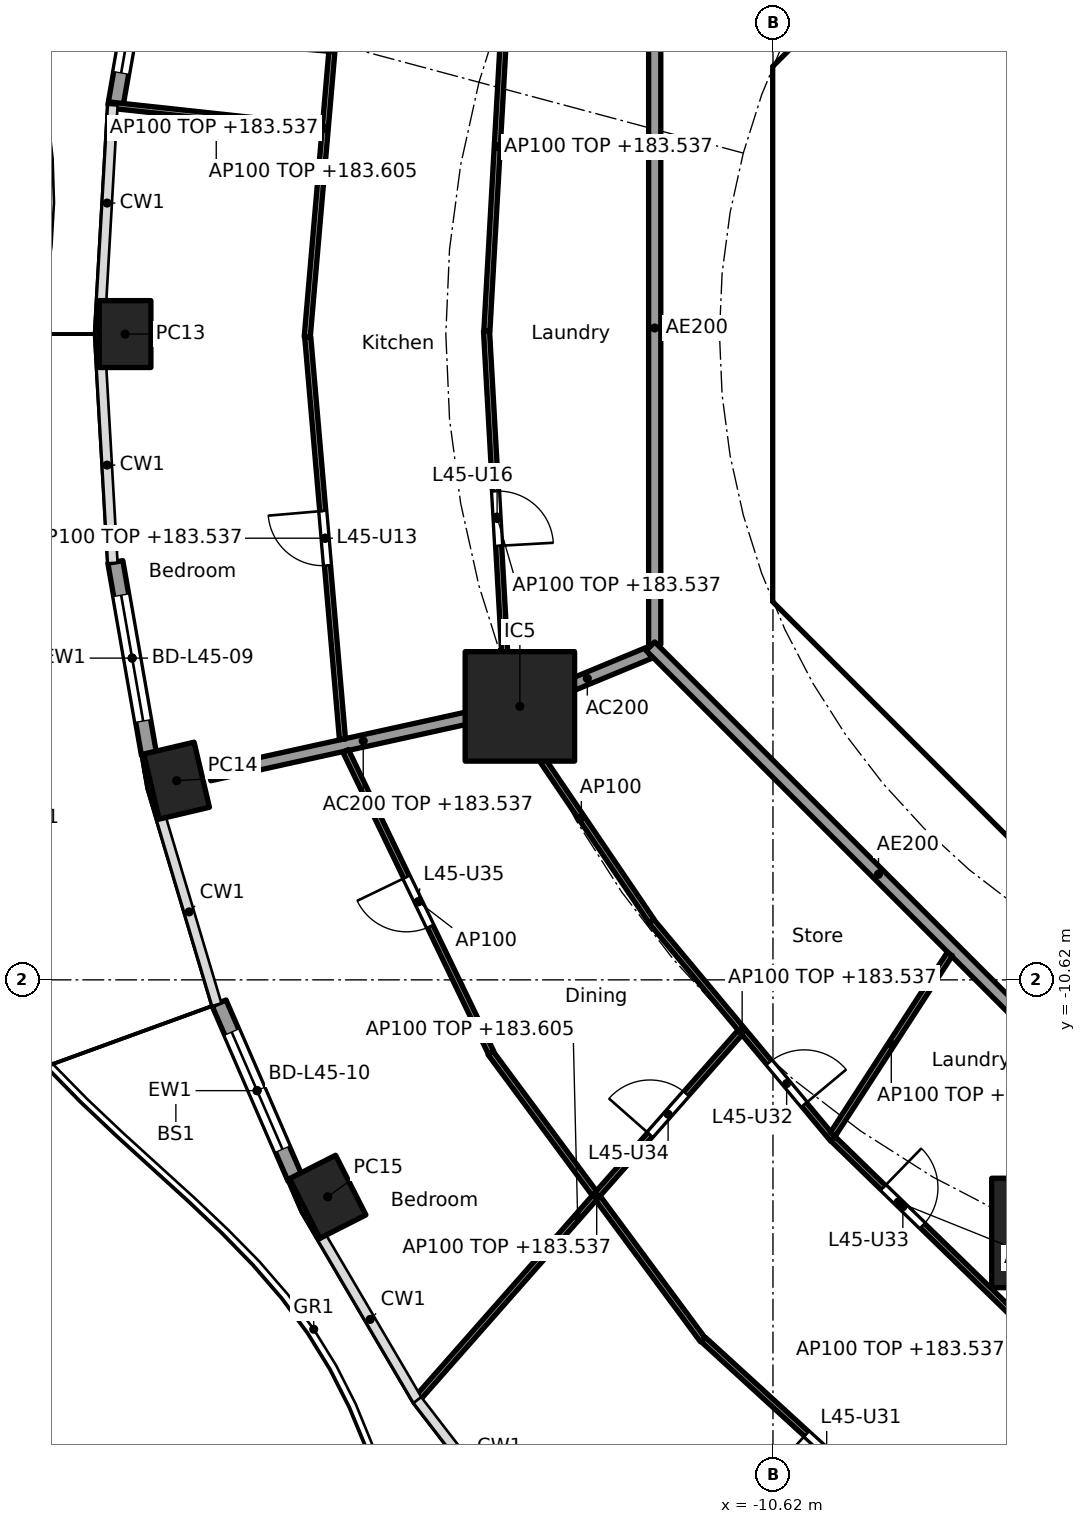
"""IFC4 building model, lengths in metres.
Left out: names, types, materials, properties, quantities, classifications, styles, units other than length and angle.
Written with IfcOpenShell. Run it as: python <this file> out.ifc"""

import sys

from ifc_helpers import new_model, si_unit, direction, frame, frame_2d, origin, origin_2d, place, context, subcontext, project, spatial, polyline, rectangle, hollow_rectangle, outline, extrude, element, fill, save


model = new_model("IFC4")
c1 = context("Model", 3, precision=1e-05, world=origin(), true_north=direction((0.0, 1.0)))
c2 = subcontext(c1, "Body", "Model", "MODEL_VIEW")
j1 = project(units=[si_unit("LENGTHUNIT", "METRE"), si_unit("PLANEANGLEUNIT", "RADIAN")], contexts=[c1])
p1 = place(None, origin())
s1 = spatial("IfcSite", under=j1, at=p1, CompositionType="ELEMENT")
p2 = place(p1, origin())
s2 = spatial("IfcBuilding", under=s1, at=p2, CompositionType="ELEMENT")
p3 = place(p2, frame((0.0, 0.0, 180.7)))
s3 = spatial("IfcBuildingStorey", under=s2, at=p3, CompositionType="ELEMENT", Elevation=180.7)
for number, where, z_axis, x_axis in (
    (1, (-21.275, 0.0, 0.0), (0.0, 0.0, 1.0), (0.0, -1.0, 0.0)),
    (2, (-20.427, -7.344, 0.0), (0.0, 0.0, 1.0), (0.229, -0.973, 0.0)),
    (3, (-17.942, -14.188, 0.0), (0.0, 0.0, 1.0), (0.452, -0.892, 0.0)),
):
    element("IfcColumn", number, at=place(p3, frame(where, z_axis=z_axis, x_axis=x_axis)), inside=s3, PredefinedType="COLUMN", context=c2, shape_type="SweptSolid", body=[
        extrude(hollow_rectangle(XDim=1.1, YDim=0.85, WallThickness=0.036, at=origin_2d()), origin(), (0.0, 0.0, 1.0), 3.7),
    ])
for number, where, z_axis, x_axis in (
    (4, (-14.782, -6.123, 0.0), (0.0, 0.0, 1.0), (1.0, 0.0, 0.0)),
    (5, (-6.123, -14.782, 0.0), (0.0, 0.0, 1.0), (1.0, 0.0, 0.0)),
):
    element("IfcColumn", number, at=place(p3, frame(where, z_axis=z_axis, x_axis=x_axis)), inside=s3, PredefinedType="COLUMN", context=c2, shape_type="SweptSolid", body=[
        extrude(rectangle(XDim=1.8, YDim=1.8, at=origin_2d()), origin(), (0.0, 0.0, 1.0), 3.7),
    ])
p4 = place(p3, frame((-21.435, 3.747, 0.0), z_axis=(0.0, 0.0, 1.0), x_axis=(0.172223552479, 0.98505789067, 0.0)))
e6 = element("IfcWall", 6, at=p4, inside=s3, PredefinedType="SOLIDWALL", context=c2, shape_type="SweptSolid", body=[
    extrude(rectangle(XDim=3.211, YDim=0.25, at=frame_2d((1.605, 0.0))), origin(), (0.0, 0.0, 1.0), 3.44),
])
p5 = place(p4, frame((0.555, 0.0, 0.0)))
e7 = element("IfcOpeningElement", 7, at=p5, cuts=e6, PredefinedType="OPENING", context=c2, shape_type="SweptSolid", body=[
    extrude(rectangle(XDim=2.1, YDim=2.4, at=frame_2d((1.05, 1.2))), frame((0.0, 0.135, 0.0), z_axis=(0.0, -1.0, 0.0), x_axis=(1.0, 0.0, 0.0)), (0.0, 0.0, 1.0), 0.27),
])
p6 = place(p3, frame((-20.882, -6.91, 0.0), z_axis=(0.0, 0.0, 1.0), x_axis=(-0.172223552479, 0.98505789067, 0.0)))
e8 = element("IfcWall", 8, at=p6, inside=s3, PredefinedType="SOLIDWALL", context=c2, shape_type="SweptSolid", body=[
    extrude(rectangle(XDim=3.211, YDim=0.25, at=frame_2d((1.605, 0.0))), origin(), (0.0, 0.0, 1.0), 3.44),
])
p7 = place(p6, frame((0.555, 0.0, 0.0)))
e9 = element("IfcOpeningElement", 9, at=p7, cuts=e8, PredefinedType="OPENING", context=c2, shape_type="SweptSolid", body=[
    extrude(rectangle(XDim=2.1, YDim=2.4, at=frame_2d((1.05, 1.2))), frame((0.0, 0.135, 0.0), z_axis=(0.0, -1.0, 0.0), x_axis=(1.0, 0.0, 0.0)), (0.0, 0.0, 1.0), 0.27),
])
p8 = place(p3, frame((-18.479, -13.883, 0.0), z_axis=(0.0, 0.0, 1.0), x_axis=(-0.397620521824, 0.917549955384, 0.0)))
e10 = element("IfcWall", 10, at=p8, inside=s3, PredefinedType="SOLIDWALL", context=c2, shape_type="SweptSolid", body=[
    extrude(rectangle(XDim=3.142, YDim=0.25, at=frame_2d((1.571, 0.0))), origin(), (0.0, 0.0, 1.0), 3.44),
])
p9 = place(p8, frame((0.521, 0.0, 0.0)))
e11 = element("IfcOpeningElement", 11, at=p9, cuts=e10, PredefinedType="OPENING", context=c2, shape_type="SweptSolid", body=[
    extrude(rectangle(XDim=2.1, YDim=2.4, at=frame_2d((1.05, 1.2))), frame((0.0, 0.135, 0.0), z_axis=(0.0, -1.0, 0.0), x_axis=(1.0, 0.0, 0.0)), (0.0, 0.0, 1.0), 0.27),
])
p10 = place(p3, frame((-4.613, 9.988, 0.0), z_axis=(0.0, 0.0, 1.0), x_axis=(-0.707106781187, -0.707106781187, 0.0)))
e12 = element("IfcWall", 12, at=p10, inside=s3, PredefinedType="SHEAR", context=c2, shape_type="SweptSolid", body=[
    extrude(rectangle(XDim=7.602, YDim=0.6, at=frame_2d((3.801, 0.0))), origin(), (0.0, 0.0, 1.0), 3.44),
])
p11 = place(p10, frame((0.351, 0.0, 0.0)))
e13 = element("IfcOpeningElement", 13, at=p11, cuts=e12, PredefinedType="OPENING", context=c2, shape_type="SweptSolid", body=[
    extrude(rectangle(XDim=1.1, YDim=2.1, at=frame_2d((0.55, 1.05))), frame((0.0, 0.31, 0.0), z_axis=(0.0, -1.0, 0.0), x_axis=(1.0, 0.0, 0.0)), (0.0, 0.0, 1.0), 0.62),
])
p12 = place(p3, frame((-10.325, 3.801, 0.0), z_axis=(0.0, 0.0, 1.0), x_axis=(0.0, -1.0, 0.0)))
e14 = element("IfcWall", 14, at=p12, inside=s3, PredefinedType="SHEAR", context=c2, shape_type="SweptSolid", body=[
    extrude(rectangle(XDim=7.602, YDim=0.6, at=frame_2d((3.801, 0.0))), origin(), (0.0, 0.0, 1.0), 3.44),
])
p13 = place(p12, frame((0.651, 0.0, 0.0)))
e15 = element("IfcOpeningElement", 15, at=p13, cuts=e14, PredefinedType="OPENING", context=c2, shape_type="SweptSolid", body=[
    extrude(rectangle(XDim=1.5, YDim=2.1, at=frame_2d((0.75, 1.05))), frame((0.0, 0.31, 0.0), z_axis=(0.0, -1.0, 0.0), x_axis=(1.0, 0.0, 0.0)), (0.0, 0.0, 1.0), 0.62),
])
p14 = place(p12, frame((5.451, 0.0, 0.0)))
e16 = element("IfcOpeningElement", 16, at=p14, cuts=e14, PredefinedType="OPENING", context=c2, shape_type="SweptSolid", body=[
    extrude(rectangle(XDim=1.5, YDim=2.1, at=frame_2d((0.75, 1.05))), frame((0.0, 0.31, 0.0), z_axis=(0.0, -1.0, 0.0), x_axis=(1.0, 0.0, 0.0)), (0.0, 0.0, 1.0), 0.62),
])
p15 = place(p3, frame((-9.988, -4.613, 0.0), z_axis=(0.0, 0.0, 1.0), x_axis=(0.707106781187, -0.707106781187, 0.0)))
e17 = element("IfcWall", 17, at=p15, inside=s3, PredefinedType="SHEAR", context=c2, shape_type="SweptSolid", body=[
    extrude(rectangle(XDim=7.602, YDim=0.6, at=frame_2d((3.801, 0.0))), origin(), (0.0, 0.0, 1.0), 3.44),
])
p16 = place(p15, frame((6.151, 0.0, 0.0)))
e18 = element("IfcOpeningElement", 18, at=p16, cuts=e17, PredefinedType="OPENING", context=c2, shape_type="SweptSolid", body=[
    extrude(rectangle(XDim=1.1, YDim=2.1, at=frame_2d((0.55, 1.05))), frame((0.0, 0.31, 0.0), z_axis=(0.0, -1.0, 0.0), x_axis=(1.0, 0.0, 0.0)), (0.0, 0.0, 1.0), 0.62),
])
p17 = place(p3, origin())
e19 = element("IfcWall", 19, at=p17, inside=s3, PredefinedType="SHEAR", context=c2, shape_type="SweptSolid", body=[
    extrude(outline(polyline([(-10.625, -3.801), (-10.025, -3.801), (-10.025, -4.152), (-9.776, -4.401), (-10.2, -4.825), (-10.625, -4.401), (-10.625, -3.801)])), origin(), (0.0, 0.0, 1.0), 3.44),
])
p18 = place(p3, origin())
e20 = element("IfcWall", 20, at=p18, inside=s3, PredefinedType="SHEAR", context=c2, shape_type="SweptSolid", body=[
    extrude(outline(polyline([(-10.2, 4.825), (-9.776, 4.401), (-10.025, 4.152), (-10.025, 3.801), (-10.625, 3.801), (-10.625, 4.401), (-10.2, 4.825)])), origin(), (0.0, 0.0, 1.0), 3.44),
])
for number, where, z_axis, x_axis in (
    (21, (-10.025, -4.0, 0.0), (0.0, 0.0, 1.0), (1.0, 0.0, 0.0)),
    (22, (-10.025, 4.0, 0.0), (0.0, 0.0, 1.0), (1.0, 0.0, 0.0)),
):
    element("IfcWall", number, at=place(p3, frame(where, z_axis=z_axis, x_axis=x_axis)), inside=s3, PredefinedType="PARTITIONING", context=c2, shape_type="SweptSolid", body=[
        extrude(rectangle(XDim=3.325, YDim=0.2, at=frame_2d((1.662, 0.0))), origin(), (0.0, 0.0, 1.0), 3.44),
    ])
p19 = place(p3, frame((-12.657, -5.243, 0.0), z_axis=(0.0, 0.0, 1.0), x_axis=(-0.923859888513, -0.38273085373, 0.0)))
e23 = element("IfcWall", 23, at=p19, inside=s3, PredefinedType="PARTITIONING", context=c2, shape_type="SweptSolid", body=[
    extrude(rectangle(XDim=2.199, YDim=0.2, at=frame_2d((1.1, 0.0))), origin(), (0.0, 0.0, 1.0), 3.44),
])
p20 = place(p3, frame((-14.831, -6.134, 0.0), z_axis=(0.0, 0.0, 1.0), x_axis=(-0.976568396888, -0.215207263354, 0.0)))
e24 = element("IfcWall", 24, at=p20, inside=s3, PredefinedType="PARTITIONING", context=c2, shape_type="SweptSolid", body=[
    extrude(rectangle(XDim=5.177, YDim=0.2, at=frame_2d((2.588, 0.0))), origin(), (0.0, 0.0, 1.0), 2.837),
])
p21 = place(p3, frame((-12.565, 5.304, 0.0), z_axis=(0.0, 0.0, 1.0), x_axis=(0.0, -1.0, 0.0)))
e25 = element("IfcWall", 25, at=p21, inside=s3, PredefinedType="PARTITIONING", context=c2, shape_type="SweptSolid", body=[
    extrude(rectangle(XDim=10.409, YDim=0.2, at=frame_2d((5.205, 0.0))), origin(), (0.0, 0.0, 1.0), 3.44),
])
p22 = place(p3, frame((-12.635, -5.134, 0.0), z_axis=(0.0, 0.0, 1.0), x_axis=(0.707106781187, -0.707106781187, 0.0)))
e26 = element("IfcWall", 26, at=p22, inside=s3, PredefinedType="PARTITIONING", context=c2, shape_type="SweptSolid", body=[
    extrude(rectangle(XDim=10.609, YDim=0.2, at=frame_2d((5.305, 0.0))), origin(), (0.0, 0.0, 1.0), 3.44),
])
p23 = place(p3, frame((-14.983, 6.117, 0.0), z_axis=(0.0, 0.0, 1.0), x_axis=(-0.056328933432, -0.998412265178, 0.0)))
e27 = element("IfcWall", 27, at=p23, inside=s3, PredefinedType="PARTITIONING", context=c2, shape_type="SweptSolid", body=[
    extrude(rectangle(XDim=6.077, YDim=0.1, at=frame_2d((3.038, 0.0))), origin(), (0.0, 0.0, 1.0), 2.837),
])
p24 = place(p3, frame((-17.687, 6.814, 0.0), z_axis=(0.0, 0.0, 1.0), x_axis=(-0.086010249709, -0.996294252189, 0.0)))
e28 = element("IfcWall", 28, at=p24, inside=s3, PredefinedType="PARTITIONING", context=c2, shape_type="SweptSolid", body=[
    extrude(rectangle(XDim=6.889, YDim=0.1, at=frame_2d((3.445, 0.0))), origin(), (0.0, 0.0, 1.0), 2.837),
])
p25 = place(p24, frame((1.297, 0.0, 0.0)))
e29 = element("IfcOpeningElement", 29, at=p25, cuts=e28, PredefinedType="OPENING", context=c2, shape_type="SweptSolid", body=[
    extrude(rectangle(XDim=0.9, YDim=2.1, at=frame_2d((0.45, 1.05))), frame((0.0, 0.06, 0.0), z_axis=(0.0, -1.0, 0.0), x_axis=(1.0, 0.0, 0.0)), (0.0, 0.0, 1.0), 0.12),
])
p26 = place(p3, frame((-18.033, 3.387, 0.0), z_axis=(0.0, 0.0, 1.0), x_axis=(-0.994194772207, 0.107595329438, 0.0)))
e30 = element("IfcWall", 30, at=p26, inside=s3, PredefinedType="PARTITIONING", context=c2, shape_type="SweptSolid", body=[
    extrude(rectangle(XDim=3.506, YDim=0.1, at=frame_2d((1.753, 0.0))), origin(), (0.0, 0.0, 1.0), 2.905),
])
p27 = place(p3, frame((-15.331, 0.05, 0.0), z_axis=(0.0, 0.0, 1.0), x_axis=(0.056310939406, -0.998413280212, 0.0)))
e31 = element("IfcWall", 31, at=p27, inside=s3, PredefinedType="PARTITIONING", context=c2, shape_type="SweptSolid", body=[
    extrude(rectangle(XDim=6.126, YDim=0.1, at=frame_2d((3.063, 0.0))), origin(), (0.0, 0.0, 1.0), 2.837),
])
p28 = place(p27, frame((2.638, 0.0, 0.0)))
e32 = element("IfcOpeningElement", 32, at=p28, cuts=e31, PredefinedType="OPENING", context=c2, shape_type="SweptSolid", body=[
    extrude(rectangle(XDim=0.9, YDim=2.1, at=frame_2d((0.45, 1.05))), frame((0.0, 0.06, 0.0), z_axis=(0.0, -1.0, 0.0), x_axis=(1.0, 0.0, 0.0)), (0.0, 0.0, 1.0), 0.12),
])
p29 = place(p3, frame((-18.271, -0.05, 0.0), z_axis=(0.0, 0.0, 1.0), x_axis=(0.086012321907, -0.996294073294, 0.0)))
e33 = element("IfcWall", 33, at=p29, inside=s3, PredefinedType="PARTITIONING", context=c2, shape_type="SweptSolid", body=[
    extrude(rectangle(XDim=6.639, YDim=0.1, at=frame_2d((3.32, 0.0))), origin(), (0.0, 0.0, 1.0), 2.837),
])
p30 = place(p29, frame((2.87, 0.0, 0.0)))
e34 = element("IfcOpeningElement", 34, at=p30, cuts=e33, PredefinedType="OPENING", context=c2, shape_type="SweptSolid", body=[
    extrude(rectangle(XDim=0.9, YDim=2.1, at=frame_2d((0.45, 1.05))), frame((0.0, 0.06, 0.0), z_axis=(0.0, -1.0, 0.0), x_axis=(1.0, 0.0, 0.0)), (0.0, 0.0, 1.0), 0.12),
])
p31 = place(p3, frame((-14.924, -6.249, 0.0), z_axis=(0.0, 0.0, 1.0), x_axis=(0.561046521684, -0.82778427172, 0.0)))
e35 = element("IfcWall", 35, at=p31, inside=s3, PredefinedType="PARTITIONING", context=c2, shape_type="SweptSolid", body=[
    extrude(rectangle(XDim=4.109, YDim=0.1, at=frame_2d((2.054, 0.0))), origin(), (0.0, 0.0, 1.0), 3.44),
])
p32 = place(p3, frame((-17.647, -6.854, 0.0), z_axis=(0.0, 0.0, 1.0), x_axis=(0.434027506504, -0.900899619046, 0.0)))
e36 = element("IfcWall", 36, at=p32, inside=s3, PredefinedType="PARTITIONING", context=c2, shape_type="SweptSolid", body=[
    extrude(rectangle(XDim=5.508, YDim=0.1, at=frame_2d((2.754, 0.0))), origin(), (0.0, 0.0, 1.0), 3.44),
])
p33 = place(p32, frame((2.304, 0.0, 0.0)))
e37 = element("IfcOpeningElement", 37, at=p33, cuts=e36, PredefinedType="OPENING", context=c2, shape_type="SweptSolid", body=[
    extrude(rectangle(XDim=0.9, YDim=2.1, at=frame_2d((0.45, 1.05))), frame((0.0, 0.06, 0.0), z_axis=(0.0, -1.0, 0.0), x_axis=(1.0, 0.0, 0.0)), (0.0, 0.0, 1.0), 0.12),
])
p34 = place(p3, frame((-12.623, -9.653, 0.0), z_axis=(0.0, 0.0, 1.0), x_axis=(0.640297481347, -0.768127030758, 0.0)))
e38 = element("IfcWall", 38, at=p34, inside=s3, PredefinedType="PARTITIONING", context=c2, shape_type="SweptSolid", body=[
    extrude(rectangle(XDim=4.672, YDim=0.1, at=frame_2d((2.336, 0.0))), origin(), (0.0, 0.0, 1.0), 2.837),
])
p35 = place(p34, frame((3.029, 0.0, 0.0)))
e39 = element("IfcOpeningElement", 39, at=p35, cuts=e38, PredefinedType="OPENING", context=c2, shape_type="SweptSolid", body=[
    extrude(rectangle(XDim=0.9, YDim=2.1, at=frame_2d((0.45, 1.05))), frame((0.0, 0.06, 0.0), z_axis=(0.0, -1.0, 0.0), x_axis=(1.0, 0.0, 0.0)), (0.0, 0.0, 1.0), 0.12),
])
p36 = place(p3, frame((-15.265, -11.821, 0.0), z_axis=(0.0, 0.0, 1.0), x_axis=(0.594711348772, -0.803939308432, 0.0)))
e40 = element("IfcWall", 40, at=p36, inside=s3, PredefinedType="PARTITIONING", context=c2, shape_type="SweptSolid", body=[
    extrude(rectangle(XDim=5.872, YDim=0.1, at=frame_2d((2.936, 0.0))), origin(), (0.0, 0.0, 1.0), 2.837),
])
p37 = place(p3, frame((-11.16, -11.485, 0.0), z_axis=(0.0, 0.0, 1.0), x_axis=(-0.661275898802, -0.750142776852, 0.0)))
e41 = element("IfcWall", 41, at=p37, inside=s3, PredefinedType="PARTITIONING", context=c2, shape_type="SweptSolid", body=[
    extrude(rectangle(XDim=8.083, YDim=0.1, at=frame_2d((4.041, 0.0))), origin(), (0.0, 0.0, 1.0), 2.905),
])
p38 = place(p37, frame((1.341, 0.0, 0.0)))
e42 = element("IfcOpeningElement", 42, at=p38, cuts=e41, PredefinedType="OPENING", context=c2, shape_type="SweptSolid", body=[
    extrude(rectangle(XDim=0.9, YDim=2.1, at=frame_2d((0.45, 1.05))), frame((0.0, 0.06, 0.0), z_axis=(0.0, -1.0, 0.0), x_axis=(1.0, 0.0, 0.0)), (0.0, 0.0, 1.0), 0.12),
])
p39 = place(p3, frame((-7.712, -10.195, 0.0), z_axis=(0.0, 0.0, 1.0), x_axis=(-0.544170086001, -0.838974920663, 0.0)))
e43 = element("IfcWall", 43, at=p39, inside=s3, PredefinedType="PARTITIONING", context=c2, shape_type="SweptSolid", body=[
    extrude(rectangle(XDim=3.535, YDim=0.1, at=frame_2d((1.768, 0.0))), origin(), (0.0, 0.0, 1.0), 2.756),
])
p40 = place(p3, frame((-9.627, -13.238, 0.0), z_axis=(0.0, 0.0, 1.0), x_axis=(0.716946269374, -0.697128429223, 0.0)))
e44 = element("IfcWall", 44, at=p40, inside=s3, PredefinedType="PARTITIONING", context=c2, shape_type="SweptSolid", body=[
    extrude(rectangle(XDim=4.25, YDim=0.1, at=frame_2d((2.125, 0.0))), origin(), (0.0, 0.0, 1.0), 2.837),
])
p41 = place(p40, frame((1.145, 0.0, 0.0)))
e45 = element("IfcOpeningElement", 45, at=p41, cuts=e44, PredefinedType="OPENING", context=c2, shape_type="SweptSolid", body=[
    extrude(rectangle(XDim=0.9, YDim=2.1, at=frame_2d((0.45, 1.05))), frame((0.0, 0.06, 0.0), z_axis=(0.0, -1.0, 0.0), x_axis=(1.0, 0.0, 0.0)), (0.0, 0.0, 1.0), 0.12),
])
p42 = place(p3, frame((-11.766, -16.535, 0.0), z_axis=(0.0, 0.0, 1.0), x_axis=(0.738053852169, -0.674741810842, 0.0)))
e46 = element("IfcWall", 46, at=p42, inside=s3, PredefinedType="PARTITIONING", context=c2, shape_type="SweptSolid", body=[
    extrude(rectangle(XDim=5.549, YDim=0.1, at=frame_2d((2.774, 0.0))), origin(), (0.0, 0.0, 1.0), 2.837),
])
p43 = place(p42, frame((2.3, 0.0, 0.0)))
e47 = element("IfcOpeningElement", 47, at=p43, cuts=e46, PredefinedType="OPENING", context=c2, shape_type="SweptSolid", body=[
    extrude(rectangle(XDim=0.9, YDim=2.1, at=frame_2d((0.45, 1.05))), frame((0.0, 0.06, 0.0), z_axis=(0.0, -1.0, 0.0), x_axis=(1.0, 0.0, 0.0)), (0.0, 0.0, 1.0), 0.12),
])
p44 = place(p5, origin())
e48 = element("IfcDoor", 48, at=p44, inside=s3, OperationType="SLIDING_TO_LEFT", PredefinedType="DOOR", context=c2, shape_type="SweptSolid", body=[
    extrude(rectangle(XDim=2.1, YDim=2.4, at=frame_2d((1.05, 1.2))), frame((0.0, 0.025, 0.0), z_axis=(0.0, -1.0, 0.0), x_axis=(1.0, 0.0, 0.0)), (0.0, 0.0, 1.0), 0.05),
])
fill(e7, e48)
p45 = place(p7, origin())
e49 = element("IfcDoor", 49, at=p45, inside=s3, OperationType="SLIDING_TO_LEFT", PredefinedType="DOOR", context=c2, shape_type="SweptSolid", body=[
    extrude(rectangle(XDim=2.1, YDim=2.4, at=frame_2d((1.05, 1.2))), frame((0.0, 0.025, 0.0), z_axis=(0.0, -1.0, 0.0), x_axis=(1.0, 0.0, 0.0)), (0.0, 0.0, 1.0), 0.05),
])
fill(e9, e49)
p46 = place(p9, origin())
e50 = element("IfcDoor", 50, at=p46, inside=s3, OperationType="SLIDING_TO_LEFT", PredefinedType="DOOR", context=c2, shape_type="SweptSolid", body=[
    extrude(rectangle(XDim=2.1, YDim=2.4, at=frame_2d((1.05, 1.2))), frame((0.0, 0.025, 0.0), z_axis=(0.0, -1.0, 0.0), x_axis=(1.0, 0.0, 0.0)), (0.0, 0.0, 1.0), 0.05),
])
fill(e11, e50)
p47 = place(p13, origin())
e51 = element("IfcDoor", 51, at=p47, inside=s3, OperationType="DOUBLE_DOOR_SINGLE_SWING", PredefinedType="DOOR", context=c2, shape_type="SweptSolid", body=[
    extrude(rectangle(XDim=1.5, YDim=2.1, at=frame_2d((0.75, 1.05))), frame((0.0, 0.025, 0.0), z_axis=(0.0, -1.0, 0.0), x_axis=(1.0, 0.0, 0.0)), (0.0, 0.0, 1.0), 0.05),
])
fill(e15, e51)
p48 = place(p14, origin())
e52 = element("IfcDoor", 52, at=p48, inside=s3, OperationType="DOUBLE_DOOR_SINGLE_SWING", PredefinedType="DOOR", context=c2, shape_type="SweptSolid", body=[
    extrude(rectangle(XDim=1.5, YDim=2.1, at=frame_2d((0.75, 1.05))), frame((0.0, 0.025, 0.0), z_axis=(0.0, -1.0, 0.0), x_axis=(1.0, 0.0, 0.0)), (0.0, 0.0, 1.0), 0.05),
])
fill(e16, e52)
p49 = place(p25, frame((0.9, 0.0, 0.0), x_axis=(-1.0, 0.0, 0.0)))
e53 = element("IfcDoor", 53, at=p49, inside=s3, OperationType="SINGLE_SWING_LEFT", PredefinedType="DOOR", context=c2, shape_type="SweptSolid", body=[
    extrude(rectangle(XDim=0.9, YDim=2.1, at=frame_2d((0.45, 1.05))), frame((0.0, 0.025, 0.0), z_axis=(0.0, -1.0, 0.0), x_axis=(1.0, 0.0, 0.0)), (0.0, 0.0, 1.0), 0.05),
])
fill(e29, e53)
p50 = place(p30, frame((0.9, 0.0, 0.0), x_axis=(-1.0, 0.0, 0.0)))
e54 = element("IfcDoor", 54, at=p50, inside=s3, OperationType="SINGLE_SWING_RIGHT", PredefinedType="DOOR", context=c2, shape_type="SweptSolid", body=[
    extrude(rectangle(XDim=0.9, YDim=2.1, at=frame_2d((0.45, 1.05))), frame((0.0, 0.025, 0.0), z_axis=(0.0, -1.0, 0.0), x_axis=(1.0, 0.0, 0.0)), (0.0, 0.0, 1.0), 0.05),
])
fill(e34, e54)
p51 = place(p28, origin())
e55 = element("IfcDoor", 55, at=p51, inside=s3, OperationType="SINGLE_SWING_RIGHT", PredefinedType="DOOR", context=c2, shape_type="SweptSolid", body=[
    extrude(rectangle(XDim=0.9, YDim=2.1, at=frame_2d((0.45, 1.05))), frame((0.0, 0.025, 0.0), z_axis=(0.0, -1.0, 0.0), x_axis=(1.0, 0.0, 0.0)), (0.0, 0.0, 1.0), 0.05),
])
fill(e32, e55)
p52 = place(p43, frame((0.9, 0.0, 0.0), x_axis=(-1.0, 0.0, 0.0)))
e56 = element("IfcDoor", 56, at=p52, inside=s3, OperationType="SINGLE_SWING_RIGHT", PredefinedType="DOOR", context=c2, shape_type="SweptSolid", body=[
    extrude(rectangle(XDim=0.9, YDim=2.1, at=frame_2d((0.45, 1.05))), frame((0.0, 0.025, 0.0), z_axis=(0.0, -1.0, 0.0), x_axis=(1.0, 0.0, 0.0)), (0.0, 0.0, 1.0), 0.05),
])
fill(e47, e56)
p53 = place(p35, origin())
e57 = element("IfcDoor", 57, at=p53, inside=s3, OperationType="SINGLE_SWING_RIGHT", PredefinedType="DOOR", context=c2, shape_type="SweptSolid", body=[
    extrude(rectangle(XDim=0.9, YDim=2.1, at=frame_2d((0.45, 1.05))), frame((0.0, 0.025, 0.0), z_axis=(0.0, -1.0, 0.0), x_axis=(1.0, 0.0, 0.0)), (0.0, 0.0, 1.0), 0.05),
])
fill(e39, e57)
p54 = place(p41, origin())
e58 = element("IfcDoor", 58, at=p54, inside=s3, OperationType="SINGLE_SWING_LEFT", PredefinedType="DOOR", context=c2, shape_type="SweptSolid", body=[
    extrude(rectangle(XDim=0.9, YDim=2.1, at=frame_2d((0.45, 1.05))), frame((0.0, 0.025, 0.0), z_axis=(0.0, -1.0, 0.0), x_axis=(1.0, 0.0, 0.0)), (0.0, 0.0, 1.0), 0.05),
])
fill(e45, e58)
p55 = place(p38, frame((0.9, 0.0, 0.0), x_axis=(-1.0, 0.0, 0.0)))
e59 = element("IfcDoor", 59, at=p55, inside=s3, OperationType="SINGLE_SWING_LEFT", PredefinedType="DOOR", context=c2, shape_type="SweptSolid", body=[
    extrude(rectangle(XDim=0.9, YDim=2.1, at=frame_2d((0.45, 1.05))), frame((0.0, 0.025, 0.0), z_axis=(0.0, -1.0, 0.0), x_axis=(1.0, 0.0, 0.0)), (0.0, 0.0, 1.0), 0.05),
])
fill(e42, e59)
p56 = place(p33, frame((0.9, 0.0, 0.0), x_axis=(-1.0, 0.0, 0.0)))
e60 = element("IfcDoor", 60, at=p56, inside=s3, OperationType="SINGLE_SWING_RIGHT", PredefinedType="DOOR", context=c2, shape_type="SweptSolid", body=[
    extrude(rectangle(XDim=0.9, YDim=2.1, at=frame_2d((0.45, 1.05))), frame((0.0, 0.025, 0.0), z_axis=(0.0, -1.0, 0.0), x_axis=(1.0, 0.0, 0.0)), (0.0, 0.0, 1.0), 0.05),
])
fill(e37, e60)
save(model, sys.argv[1])
